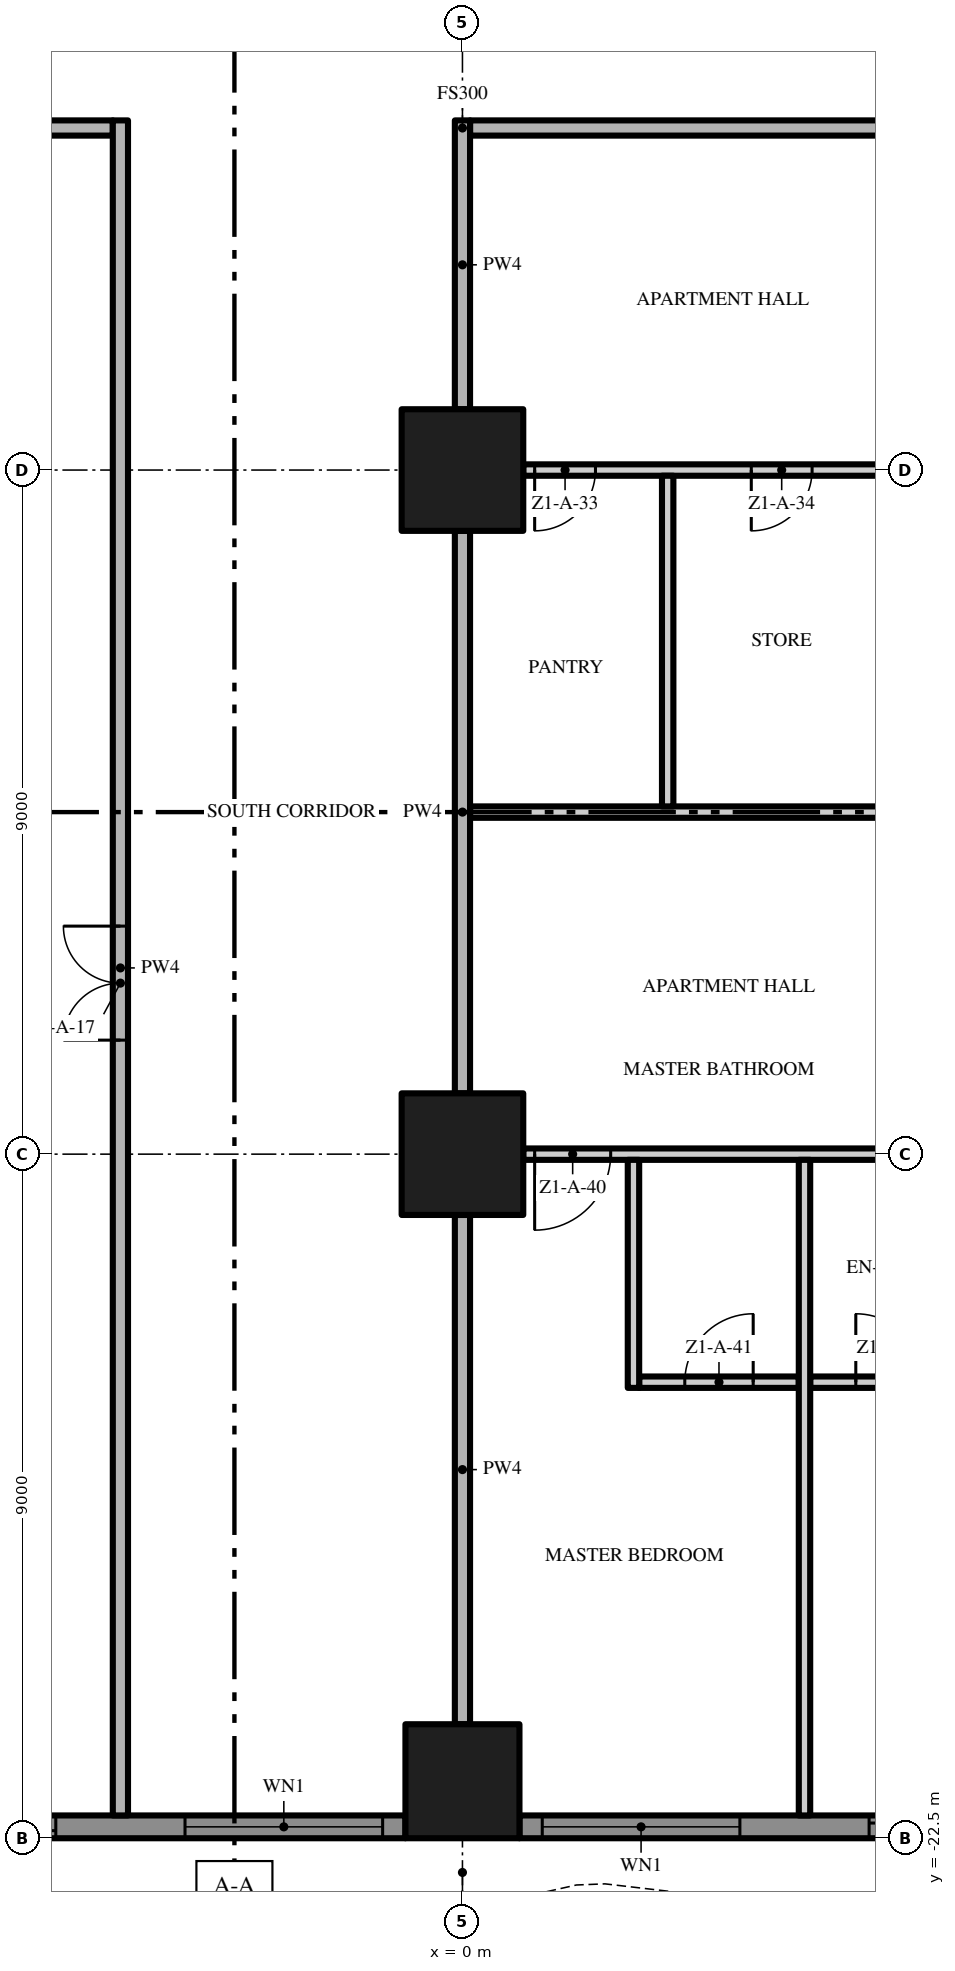
"""IFC4 building model, lengths in metres.
Left out: names, types, materials, properties, quantities, classifications, styles, units other than length and angle.
Written with IfcOpenShell. Run it as: python <this file> out.ifc"""

import sys

from ifc_helpers import new_model, si_unit, direction, frame, frame_2d, origin, origin_2d, place, context, subcontext, project, spatial, polyline, rectangle, outline, extrude, element, fill, save


model = new_model("IFC4")
c1 = context("Model", 3, precision=1e-05, world=origin(), true_north=direction((0.0, 1.0)))
c2 = subcontext(c1, "Body", "Model", "MODEL_VIEW")
j1 = project(units=[si_unit("LENGTHUNIT", "METRE"), si_unit("PLANEANGLEUNIT", "RADIAN")], contexts=[c1])
p1 = place(None, origin())
s1 = spatial("IfcSite", under=j1, at=p1, CompositionType="ELEMENT")
p2 = place(p1, origin())
s2 = spatial("IfcBuilding", under=s1, at=p2, CompositionType="ELEMENT")
p3 = place(p2, frame((0.0, 0.0, 18.8)))
s3 = spatial("IfcBuildingStorey", under=s2, at=p3, CompositionType="ELEMENT", Elevation=18.8)
p4 = place(p3, frame((0.0, -13.5, 0.0), z_axis=(0.0, 0.0, 1.0), x_axis=(1.0, 0.0, 0.0)))
e1 = element("IfcColumn", 1, at=p4, inside=s3, PredefinedType="COLUMN", context=c2, shape_type="SweptSolid", body=[
    extrude(rectangle(XDim=1.6, YDim=1.6, at=origin_2d()), origin(), (0.0, 0.0, 1.0), 3.5),
])
p5 = place(p3, frame((0.0, -21.75, 0.0), z_axis=(0.0, 0.0, 1.0), x_axis=(1.0, 0.0, 0.0)))
e2 = element("IfcColumn", 2, at=p5, inside=s3, PredefinedType="COLUMN", context=c2, shape_type="SweptSolid", body=[
    extrude(rectangle(XDim=1.5, YDim=1.5, at=origin_2d()), origin(), (0.0, 0.0, 1.0), 3.5),
])
p6 = place(p3, frame((0.0, -4.5, 0.0), z_axis=(0.0, 0.0, 1.0), x_axis=(1.0, 0.0, 0.0)))
e3 = element("IfcColumn", 3, at=p6, inside=s3, PredefinedType="COLUMN", context=c2, shape_type="SweptSolid", body=[
    extrude(rectangle(XDim=1.6, YDim=1.6, at=origin_2d()), origin(), (0.0, 0.0, 1.0), 3.5),
])
p7 = place(p3, frame((-0.75, -22.35, 0.0), z_axis=(0.0, 0.0, 1.0), x_axis=(-1.0, 0.0, 0.0)))
e4 = element("IfcWall", 4, at=p7, inside=s3, PredefinedType="SOLIDWALL", context=c2, shape_type="SweptSolid", body=[
    extrude(rectangle(XDim=7.5, YDim=0.3, at=frame_2d((3.75, 0.0))), origin(), (0.0, 0.0, 1.0), 3.5),
])
p8 = place(p7, frame((4.6, 0.0, 0.0)))
e5 = element("IfcOpeningElement", 5, at=p8, cuts=e4, PredefinedType="OPENING", context=c2, shape_type="SweptSolid", body=[
    extrude(rectangle(XDim=2.6, YDim=2.4, at=frame_2d((1.3, 1.2))), frame((0.0, 0.16, 0.0), z_axis=(0.0, -1.0, 0.0), x_axis=(1.0, 0.0, 0.0)), (0.0, 0.0, 1.0), 0.32),
])
p9 = place(p7, frame((0.3, 0.0, 0.45)))
e6 = element("IfcOpeningElement", 6, at=p9, cuts=e4, PredefinedType="OPENING", context=c2, shape_type="SweptSolid", body=[
    extrude(rectangle(XDim=2.6, YDim=2.65, at=frame_2d((1.3, 1.325))), frame((0.0, 0.16, 0.0), z_axis=(0.0, -1.0, 0.0), x_axis=(1.0, 0.0, 0.0)), (0.0, 0.0, 1.0), 0.32),
])
p10 = place(p3, frame((8.25, -22.35, 0.0), z_axis=(0.0, 0.0, 1.0), x_axis=(-1.0, 0.0, 0.0)))
e7 = element("IfcWall", 7, at=p10, inside=s3, PredefinedType="SOLIDWALL", context=c2, shape_type="SweptSolid", body=[
    extrude(rectangle(XDim=7.5, YDim=0.3, at=frame_2d((3.75, 0.0))), origin(), (0.0, 0.0, 1.0), 3.5),
])
p11 = place(p10, frame((4.6, 0.0, 0.45)))
e8 = element("IfcOpeningElement", 8, at=p11, cuts=e7, PredefinedType="OPENING", context=c2, shape_type="SweptSolid", body=[
    extrude(rectangle(XDim=2.6, YDim=2.65, at=frame_2d((1.3, 1.325))), frame((0.0, 0.16, 0.0), z_axis=(0.0, -1.0, 0.0), x_axis=(1.0, 0.0, 0.0)), (0.0, 0.0, 1.0), 0.32),
])
p12 = place(p10, frame((0.3, 0.0, 0.0)))
e9 = element("IfcOpeningElement", 9, at=p12, cuts=e7, PredefinedType="OPENING", context=c2, shape_type="SweptSolid", body=[
    extrude(rectangle(XDim=2.6, YDim=2.4, at=frame_2d((1.3, 1.2))), frame((0.0, 0.16, 0.0), z_axis=(0.0, -1.0, 0.0), x_axis=(1.0, 0.0, 0.0)), (0.0, 0.0, 1.0), 0.32),
])
p13 = place(p3, origin())
e10 = element("IfcWall", 10, at=p13, inside=s3, PredefinedType="USERDEFINED", context=c2, shape_type="SweptSolid", body=[
    extrude(outline(polyline([(-22.5, -25.149), (-21.0, -25.485), (-20.625, -25.5), (-19.5, -25.369), (-18.0, -24.845), (-16.5, -24.112), (-15.0, -23.451), (-13.5, -23.115), (-13.125, -23.1), (-12.0, -23.231), (-10.5, -23.755), (-9.0, -24.488), (-7.5, -25.149), (-6.0, -25.485), (-5.625, -25.5), (-4.5, -25.369), (-3.0, -24.845), (-1.5, -24.112), (0.0, -23.451), (1.5, -23.115), (1.875, -23.1), (3.0, -23.231), (4.5, -23.755), (6.0, -24.488), (7.5, -25.149), (9.0, -25.485), (9.375, -25.5), (10.5, -25.369), (12.0, -24.845), (13.5, -24.112), (15.0, -23.451), (16.5, -23.115), (16.875, -23.1), (18.0, -23.231), (19.5, -23.755), (21.0, -24.488), (22.5, -25.149), (22.601, -24.92), (21.105, -24.261), (19.596, -23.524), (18.056, -22.986), (16.885, -22.849), (16.467, -22.866), (14.921, -23.213), (13.395, -23.885), (11.904, -24.614), (10.444, -25.124), (9.365, -25.249), (9.033, -25.236), (7.579, -24.91), (6.105, -24.261), (4.596, -23.524), (3.056, -22.986), (1.885, -22.849), (1.467, -22.866), (-0.079, -23.213), (-1.605, -23.885), (-3.096, -24.614), (-4.556, -25.124), (-5.635, -25.249), (-5.967, -25.236), (-7.421, -24.91), (-8.895, -24.261), (-10.404, -23.524), (-11.944, -22.986), (-13.115, -22.849), (-13.533, -22.866), (-15.079, -23.213), (-16.605, -23.885), (-18.096, -24.614), (-19.556, -25.124), (-20.635, -25.249), (-20.967, -25.236), (-22.445, -24.905), (-22.5, -25.149)])), origin(), (0.0, 0.0, 1.0), 0.9),
])
p14 = place(p3, frame((2.325, -16.5, 0.0), z_axis=(0.0, 0.0, 1.0), x_axis=(1.0, 0.0, 0.0)))
e11 = element("IfcWall", 11, at=p14, inside=s3, PredefinedType="PARTITIONING", context=c2, shape_type="SweptSolid", body=[
    extrude(rectangle(XDim=2.1, YDim=0.15, at=frame_2d((1.05, 0.0))), origin(), (0.0, 0.0, 1.0), 3.5),
])
p15 = place(p14, frame((0.6, 0.0, 0.0)))
e12 = element("IfcOpeningElement", 12, at=p15, cuts=e11, PredefinedType="OPENING", context=c2, shape_type="SweptSolid", body=[
    extrude(rectangle(XDim=0.9, YDim=2.1, at=frame_2d((0.45, 1.05))), frame((0.0, 0.085, 0.0), z_axis=(0.0, -1.0, 0.0), x_axis=(1.0, 0.0, 0.0)), (0.0, 0.0, 1.0), 0.17),
])
p16 = place(p3, frame((4.575, -16.5, 0.0), z_axis=(0.0, 0.0, 1.0), x_axis=(1.0, 0.0, 0.0)))
e13 = element("IfcWall", 13, at=p16, inside=s3, PredefinedType="PARTITIONING", context=c2, shape_type="SweptSolid", body=[
    extrude(rectangle(XDim=2.1, YDim=0.15, at=frame_2d((1.05, 0.0))), origin(), (0.0, 0.0, 1.0), 3.5),
])
p17 = place(p16, frame((0.6, 0.0, 0.0)))
e14 = element("IfcOpeningElement", 14, at=p17, cuts=e13, PredefinedType="OPENING", context=c2, shape_type="SweptSolid", body=[
    extrude(rectangle(XDim=0.9, YDim=2.1, at=frame_2d((0.45, 1.05))), frame((0.0, 0.085, 0.0), z_axis=(0.0, -1.0, 0.0), x_axis=(1.0, 0.0, 0.0)), (0.0, 0.0, 1.0), 0.17),
])
p18 = place(p3, frame((8.2, -13.5, 0.0), z_axis=(0.0, 0.0, 1.0), x_axis=(-1.0, 0.0, 0.0)))
e15 = element("IfcWall", 15, at=p18, inside=s3, PredefinedType="PARTITIONING", context=c2, shape_type="SweptSolid", body=[
    extrude(rectangle(XDim=7.4, YDim=0.15, at=frame_2d((3.7, 0.0))), origin(), (0.0, 0.0, 1.0), 3.5),
])
p19 = place(p18, frame((6.25, 0.0, 0.0)))
e16 = element("IfcOpeningElement", 16, at=p19, cuts=e15, PredefinedType="OPENING", context=c2, shape_type="SweptSolid", body=[
    extrude(rectangle(XDim=1.0, YDim=2.4, at=frame_2d((0.5, 1.2))), frame((0.0, 0.085, 0.0), z_axis=(0.0, -1.0, 0.0), x_axis=(1.0, 0.0, 0.0)), (0.0, 0.0, 1.0), 0.17),
])
p20 = place(p18, frame((0.15, 0.0, 0.0)))
e17 = element("IfcOpeningElement", 17, at=p20, cuts=e15, PredefinedType="OPENING", context=c2, shape_type="SweptSolid", body=[
    extrude(rectangle(XDim=1.0, YDim=2.4, at=frame_2d((0.5, 1.2))), frame((0.0, 0.085, 0.0), z_axis=(0.0, -1.0, 0.0), x_axis=(1.0, 0.0, 0.0)), (0.0, 0.0, 1.0), 0.17),
])
p21 = place(p3, frame((0.1, -9.0, 0.0), z_axis=(0.0, 0.0, 1.0), x_axis=(1.0, 0.0, 0.0)))
e18 = element("IfcWall", 18, at=p21, inside=s3, PredefinedType="PARTITIONING", context=c2, shape_type="SweptSolid", body=[
    extrude(rectangle(XDim=13.775, YDim=0.15, at=frame_2d((6.888, 0.0))), origin(), (0.0, 0.0, 1.0), 3.5),
])
p22 = place(p21, frame((8.1, 0.0, 0.0)))
e19 = element("IfcOpeningElement", 19, at=p22, cuts=e18, PredefinedType="OPENING", context=c2, shape_type="SweptSolid", body=[
    extrude(rectangle(XDim=1.0, YDim=2.4, at=frame_2d((0.5, 1.2))), frame((0.0, 0.085, 0.0), z_axis=(0.0, -1.0, 0.0), x_axis=(1.0, 0.0, 0.0)), (0.0, 0.0, 1.0), 0.17),
])
p23 = place(p3, frame((8.2, -4.5, 0.0), z_axis=(0.0, 0.0, 1.0), x_axis=(-1.0, 0.0, 0.0)))
e20 = element("IfcWall", 20, at=p23, inside=s3, PredefinedType="PARTITIONING", context=c2, shape_type="SweptSolid", body=[
    extrude(rectangle(XDim=7.4, YDim=0.15, at=frame_2d((3.7, 0.0))), origin(), (0.0, 0.0, 1.0), 3.5),
])
p24 = place(p23, frame((6.45, 0.0, 0.0)))
e21 = element("IfcOpeningElement", 21, at=p24, cuts=e20, PredefinedType="OPENING", context=c2, shape_type="SweptSolid", body=[
    extrude(rectangle(XDim=0.8, YDim=2.0, at=frame_2d((0.4, 1.0))), frame((0.0, 0.085, 0.0), z_axis=(0.0, -1.0, 0.0), x_axis=(1.0, 0.0, 0.0)), (0.0, 0.0, 1.0), 0.17),
])
p25 = place(p23, frame((3.6, 0.0, 0.0)))
e22 = element("IfcOpeningElement", 22, at=p25, cuts=e20, PredefinedType="OPENING", context=c2, shape_type="SweptSolid", body=[
    extrude(rectangle(XDim=0.8, YDim=2.0, at=frame_2d((0.4, 1.0))), frame((0.0, 0.085, 0.0), z_axis=(0.0, -1.0, 0.0), x_axis=(1.0, 0.0, 0.0)), (0.0, 0.0, 1.0), 0.17),
])
p26 = place(p3, frame((-17.4, 0.0, 0.0), z_axis=(0.0, 0.0, 1.0), x_axis=(1.0, 0.0, 0.0)))
e23 = element("IfcWall", 23, at=p26, inside=s3, PredefinedType="PARTITIONING", context=c2, shape_type="SweptSolid", body=[
    extrude(rectangle(XDim=12.8, YDim=0.2, at=frame_2d((6.4, 0.0))), origin(), (0.0, 0.0, 1.0), 3.5),
])
p27 = place(p3, frame((17.4, 0.0, 0.0), z_axis=(0.0, 0.0, 1.0), x_axis=(-1.0, 0.0, 0.0)))
e24 = element("IfcWall", 24, at=p27, inside=s3, PredefinedType="PARTITIONING", context=c2, shape_type="SweptSolid", body=[
    extrude(rectangle(XDim=17.3, YDim=0.2, at=frame_2d((8.65, 0.0))), origin(), (0.0, 0.0, 1.0), 3.5),
])
p28 = place(p27, frame((7.65, 0.0, 0.0)))
e25 = element("IfcOpeningElement", 25, at=p28, cuts=e24, PredefinedType="OPENING", context=c2, shape_type="SweptSolid", body=[
    extrude(rectangle(XDim=1.5, YDim=2.4, at=frame_2d((0.75, 1.2))), frame((0.0, 0.11, 0.0), z_axis=(0.0, -1.0, 0.0), x_axis=(1.0, 0.0, 0.0)), (0.0, 0.0, 1.0), 0.22),
])
p29 = place(p3, frame((-4.5, -22.2, 0.0), z_axis=(0.0, 0.0, 1.0), x_axis=(0.0, 1.0, 0.0)))
e26 = element("IfcWall", 26, at=p29, inside=s3, PredefinedType="PARTITIONING", context=c2, shape_type="SweptSolid", body=[
    extrude(rectangle(XDim=22.3, YDim=0.2, at=frame_2d((11.15, 0.0))), origin(), (0.0, 0.0, 1.0), 3.5),
])
p30 = place(p29, frame((10.2, 0.0, 0.0)))
e27 = element("IfcOpeningElement", 27, at=p30, cuts=e26, PredefinedType="OPENING", context=c2, shape_type="SweptSolid", body=[
    extrude(rectangle(XDim=1.5, YDim=2.4, at=frame_2d((0.75, 1.2))), frame((0.0, 0.11, 0.0), z_axis=(0.0, -1.0, 0.0), x_axis=(1.0, 0.0, 0.0)), (0.0, 0.0, 1.0), 0.22),
])
p31 = place(p3, frame((0.0, -21.0, 0.0), z_axis=(0.0, 0.0, 1.0), x_axis=(0.0, 1.0, 0.0)))
e28 = element("IfcWall", 28, at=p31, inside=s3, PredefinedType="PARTITIONING", context=c2, shape_type="SweptSolid", body=[
    extrude(rectangle(XDim=6.7, YDim=0.2, at=frame_2d((3.35, 0.0))), origin(), (0.0, 0.0, 1.0), 3.5),
])
p32 = place(p3, frame((0.0, -12.7, 0.0), z_axis=(0.0, 0.0, 1.0), x_axis=(0.0, 1.0, 0.0)))
e29 = element("IfcWall", 29, at=p32, inside=s3, PredefinedType="PARTITIONING", context=c2, shape_type="SweptSolid", body=[
    extrude(rectangle(XDim=7.4, YDim=0.2, at=frame_2d((3.7, 0.0))), origin(), (0.0, 0.0, 1.0), 3.5),
])
p33 = place(p3, frame((0.0, -3.7, 0.0), z_axis=(0.0, 0.0, 1.0), x_axis=(0.0, 1.0, 0.0)))
e30 = element("IfcWall", 30, at=p33, inside=s3, PredefinedType="PARTITIONING", context=c2, shape_type="SweptSolid", body=[
    extrude(rectangle(XDim=3.8, YDim=0.2, at=frame_2d((1.9, 0.0))), origin(), (0.0, 0.0, 1.0), 3.5),
])
p34 = place(p3, frame((2.25, -16.575, 0.0), z_axis=(0.0, 0.0, 1.0), x_axis=(0.0, 1.0, 0.0)))
e31 = element("IfcWall", 31, at=p34, inside=s3, PredefinedType="PARTITIONING", context=c2, shape_type="SweptSolid", body=[
    extrude(rectangle(XDim=3.0, YDim=0.15, at=frame_2d((1.5, 0.0))), origin(), (0.0, 0.0, 1.0), 3.5),
])
p35 = place(p3, frame((2.7, -8.925, 0.0), z_axis=(0.0, 0.0, 1.0), x_axis=(0.0, 1.0, 0.0)))
e32 = element("IfcWall", 32, at=p35, inside=s3, PredefinedType="PARTITIONING", context=c2, shape_type="SweptSolid", body=[
    extrude(rectangle(XDim=4.35, YDim=0.15, at=frame_2d((2.175, 0.0))), origin(), (0.0, 0.0, 1.0), 3.5),
])
p36 = place(p3, frame((4.5, -22.2, 0.0), z_axis=(0.0, 0.0, 1.0), x_axis=(0.0, 1.0, 0.0)))
e33 = element("IfcWall", 33, at=p36, inside=s3, PredefinedType="PARTITIONING", context=c2, shape_type="SweptSolid", body=[
    extrude(rectangle(XDim=8.625, YDim=0.15, at=frame_2d((4.312, 0.0))), origin(), (0.0, 0.0, 1.0), 3.5),
])
p37 = place(p8, origin())
e34 = element("IfcDoor", 34, at=p37, inside=s3, OperationType="SINGLE_SWING_LEFT", PredefinedType="DOOR", context=c2, shape_type="SweptSolid", body=[
    extrude(rectangle(XDim=2.6, YDim=2.4, at=frame_2d((1.3, 1.2))), frame((0.0, 0.025, 0.0), z_axis=(0.0, -1.0, 0.0), x_axis=(1.0, 0.0, 0.0)), (0.0, 0.0, 1.0), 0.05),
])
fill(e5, e34)
p38 = place(p9, origin())
e35 = element("IfcWindow", 35, at=p38, inside=s3, PartitioningType="SINGLE_PANEL", PredefinedType="WINDOW", context=c2, shape_type="SweptSolid", body=[
    extrude(rectangle(XDim=2.6, YDim=2.65, at=frame_2d((1.3, 1.325))), frame((0.0, 0.03, 0.0), z_axis=(0.0, -1.0, 0.0), x_axis=(1.0, 0.0, 0.0)), (0.0, 0.0, 1.0), 0.06),
])
fill(e6, e35)
p39 = place(p11, origin())
e36 = element("IfcWindow", 36, at=p39, inside=s3, PartitioningType="SINGLE_PANEL", PredefinedType="WINDOW", context=c2, shape_type="SweptSolid", body=[
    extrude(rectangle(XDim=2.6, YDim=2.65, at=frame_2d((1.3, 1.325))), frame((0.0, 0.03, 0.0), z_axis=(0.0, -1.0, 0.0), x_axis=(1.0, 0.0, 0.0)), (0.0, 0.0, 1.0), 0.06),
])
fill(e8, e36)
p40 = place(p12, origin())
e37 = element("IfcDoor", 37, at=p40, inside=s3, OperationType="SINGLE_SWING_LEFT", PredefinedType="DOOR", context=c2, shape_type="SweptSolid", body=[
    extrude(rectangle(XDim=2.6, YDim=2.4, at=frame_2d((1.3, 1.2))), frame((0.0, 0.025, 0.0), z_axis=(0.0, -1.0, 0.0), x_axis=(1.0, 0.0, 0.0)), (0.0, 0.0, 1.0), 0.05),
])
fill(e9, e37)
p41 = place(p30, origin())
e38 = element("IfcDoor", 38, at=p41, inside=s3, OperationType="DOUBLE_DOOR_SINGLE_SWING", PredefinedType="DOOR", context=c2, shape_type="SweptSolid", body=[
    extrude(rectangle(XDim=1.5, YDim=2.4, at=frame_2d((0.75, 1.2))), frame((0.0, 0.025, 0.0), z_axis=(0.0, -1.0, 0.0), x_axis=(1.0, 0.0, 0.0)), (0.0, 0.0, 1.0), 0.05),
])
fill(e27, e38)
p42 = place(p24, origin())
e39 = element("IfcDoor", 39, at=p42, inside=s3, OperationType="SINGLE_SWING_RIGHT", PredefinedType="DOOR", context=c2, shape_type="SweptSolid", body=[
    extrude(rectangle(XDim=0.8, YDim=2.0, at=frame_2d((0.4, 1.0))), frame((0.0, 0.025, 0.0), z_axis=(0.0, -1.0, 0.0), x_axis=(1.0, 0.0, 0.0)), (0.0, 0.0, 1.0), 0.05),
])
fill(e21, e39)
p43 = place(p25, origin())
e40 = element("IfcDoor", 40, at=p43, inside=s3, OperationType="SINGLE_SWING_RIGHT", PredefinedType="DOOR", context=c2, shape_type="SweptSolid", body=[
    extrude(rectangle(XDim=0.8, YDim=2.0, at=frame_2d((0.4, 1.0))), frame((0.0, 0.025, 0.0), z_axis=(0.0, -1.0, 0.0), x_axis=(1.0, 0.0, 0.0)), (0.0, 0.0, 1.0), 0.05),
])
fill(e22, e40)
p44 = place(p19, origin())
e41 = element("IfcDoor", 41, at=p44, inside=s3, OperationType="SINGLE_SWING_RIGHT", PredefinedType="DOOR", context=c2, shape_type="SweptSolid", body=[
    extrude(rectangle(XDim=1.0, YDim=2.4, at=frame_2d((0.5, 1.2))), frame((0.0, 0.025, 0.0), z_axis=(0.0, -1.0, 0.0), x_axis=(1.0, 0.0, 0.0)), (0.0, 0.0, 1.0), 0.05),
])
fill(e16, e41)
p45 = place(p15, origin())
e42 = element("IfcDoor", 42, at=p45, inside=s3, OperationType="SINGLE_SWING_RIGHT", PredefinedType="DOOR", context=c2, shape_type="SweptSolid", body=[
    extrude(rectangle(XDim=0.9, YDim=2.1, at=frame_2d((0.45, 1.05))), frame((0.0, 0.025, 0.0), z_axis=(0.0, -1.0, 0.0), x_axis=(1.0, 0.0, 0.0)), (0.0, 0.0, 1.0), 0.05),
])
fill(e12, e42)
p46 = place(p17, origin())
e43 = element("IfcDoor", 43, at=p46, inside=s3, OperationType="SINGLE_SWING_LEFT", PredefinedType="DOOR", context=c2, shape_type="SweptSolid", body=[
    extrude(rectangle(XDim=0.9, YDim=2.1, at=frame_2d((0.45, 1.05))), frame((0.0, 0.025, 0.0), z_axis=(0.0, -1.0, 0.0), x_axis=(1.0, 0.0, 0.0)), (0.0, 0.0, 1.0), 0.05),
])
fill(e14, e43)
save(model, sys.argv[1])
